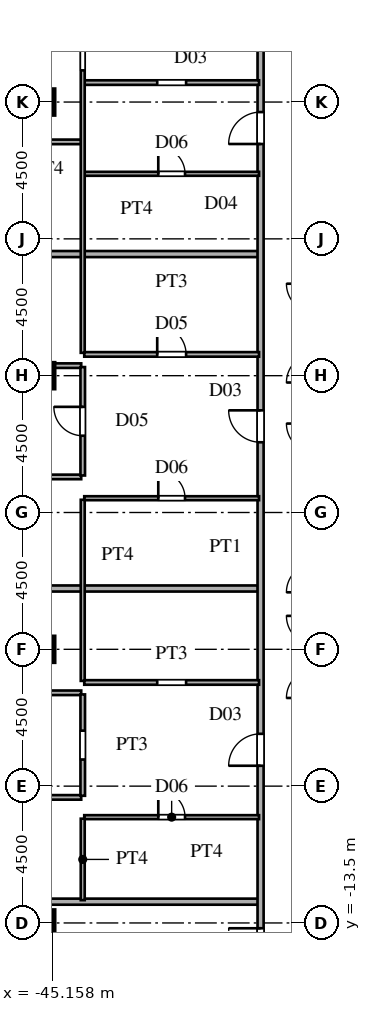
"""IFC4 building model, lengths in metres.
Left out: names, types, materials, properties, quantities, classifications, styles, units other than length and angle.
Written with IfcOpenShell. Run it as: python <this file> out.ifc"""

import sys

from ifc_helpers import new_model, si_unit, direction, frame, frame_2d, origin, origin_2d, place, context, subcontext, project, spatial, rectangle, i_section, extrude, source, transform, mapped, element, fill, save


model = new_model("IFC4")
c1 = context("Model", 3, precision=1e-05, world=origin(), true_north=direction((0.0, 1.0)))
c2 = subcontext(c1, "Body", "Model", "MODEL_VIEW")
j1 = project(units=[si_unit("LENGTHUNIT", "METRE"), si_unit("PLANEANGLEUNIT", "RADIAN")], contexts=[c1])
p1 = place(None, origin())
s1 = spatial("IfcSite", under=j1, at=p1, CompositionType="ELEMENT")
p2 = place(p1, origin())
s2 = spatial("IfcBuilding", under=s1, at=p2, CompositionType="ELEMENT")
p3 = place(p2, frame((0.0, 0.0, 99.6)))
s3 = spatial("IfcBuildingStorey", under=s2, at=p3, CompositionType="ELEMENT", Elevation=99.6)
m1 = source(origin(), c2, "Body", "SweptSolid", [
    extrude(i_section(OverallWidth=0.8, OverallDepth=0.8, WebThickness=0.032, FlangeThickness=0.05, at=origin_2d()), origin(), (0.0, 0.0, 1.0), 3.6),
])
for number, where, z_axis, x_axis in (
    (1, (-45.5, -13.5, 0.0), (0.0, 0.0, 1.0), (1.0, 0.0, 0.0)),
    (2, (-45.5, -4.5, 0.0), (0.0, 0.0, 1.0), (1.0, 0.0, 0.0)),
    (3, (-45.5, 4.5, 0.0), (0.0, 0.0, 1.0), (1.0, 0.0, 0.0)),
    (4, (-45.5, 13.5, 0.0), (0.0, 0.0, 1.0), (1.0, 0.0, 0.0)),
):
    element("IfcColumn", number, at=place(p3, frame(where, z_axis=z_axis, x_axis=x_axis)), inside=s3, PredefinedType="COLUMN", context=c2, shape_type="MappedRepresentation", body=[
        mapped(m1, transform((0.0, 0.0, 0.0), scale=1.0)),
    ])
p4 = place(p3, frame((-59.234, -12.8, 0.0), z_axis=(0.0, 0.0, 1.0), x_axis=(1.0, 0.0, 0.0)))
e5 = element("IfcWall", 5, at=p4, inside=s3, PredefinedType="PARTITIONING", context=c2, shape_type="SweptSolid", body=[
    extrude(rectangle(XDim=20.854, YDim=0.2, at=frame_2d((10.427, 0.0))), origin(), (0.0, 0.0, 1.0), 3.38),
])
p5 = place(p3, frame((-44.1, -10.02, 0.0), z_axis=(0.0, 0.0, 1.0), x_axis=(1.0, 0.0, 0.0)))
e6 = element("IfcWall", 6, at=p5, inside=s3, PredefinedType="PARTITIONING", context=c2, shape_type="SweptSolid", body=[
    extrude(rectangle(XDim=5.75, YDim=0.13, at=frame_2d((2.875, 0.0))), origin(), (0.0, 0.0, 1.0), 3.38),
])
p6 = place(p5, frame((2.435, 0.0, 0.0)))
e7 = element("IfcOpeningElement", 7, at=p6, cuts=e6, PredefinedType="OPENING", context=c2, shape_type="SweptSolid", body=[
    extrude(rectangle(XDim=0.88, YDim=2.1, at=frame_2d((0.44, 1.05))), frame((0.0, 0.075, 0.0), z_axis=(0.0, -1.0, 0.0), x_axis=(1.0, 0.0, 0.0)), (0.0, 0.0, 1.0), 0.15),
])
p7 = place(p3, frame((-66.887, -9.37, 0.0), z_axis=(0.0, 0.0, 1.0), x_axis=(1.0, 0.0, 0.0)))
e8 = element("IfcWall", 8, at=p7, inside=s3, PredefinedType="PARTITIONING", context=c2, shape_type="SweptSolid", body=[
    extrude(rectangle(XDim=22.687, YDim=0.15, at=frame_2d((11.344, 0.0))), origin(), (0.0, 0.0, 1.0), 3.38),
])
p8 = place(p7, frame((17.087, 0.0, 0.0)))
e9 = element("IfcOpeningElement", 9, at=p8, cuts=e8, PredefinedType="OPENING", context=c2, shape_type="SweptSolid", body=[
    extrude(rectangle(XDim=0.95, YDim=2.15, at=frame_2d((0.475, 1.075))), frame((0.0, 0.085, 0.0), z_axis=(0.0, -1.0, 0.0), x_axis=(1.0, 0.0, 0.0)), (0.0, 0.0, 1.0), 0.17),
])
p9 = place(p3, frame((-71.035, -5.93, 0.0), z_axis=(0.0, 0.0, 1.0), x_axis=(1.0, 0.0, 0.0)))
e10 = element("IfcWall", 10, at=p9, inside=s3, PredefinedType="PARTITIONING", context=c2, shape_type="SweptSolid", body=[
    extrude(rectangle(XDim=26.835, YDim=0.15, at=frame_2d((13.417, 0.0))), origin(), (0.0, 0.0, 1.0), 3.38),
])
p10 = place(p9, frame((21.235, 0.0, 0.0)))
e11 = element("IfcOpeningElement", 11, at=p10, cuts=e10, PredefinedType="OPENING", context=c2, shape_type="SweptSolid", body=[
    extrude(rectangle(XDim=0.95, YDim=2.15, at=frame_2d((0.475, 1.075))), frame((0.0, 0.085, 0.0), z_axis=(0.0, -1.0, 0.0), x_axis=(1.0, 0.0, 0.0)), (0.0, 0.0, 1.0), 0.17),
])
p11 = place(p3, frame((-44.1, -5.59, 0.0), z_axis=(0.0, 0.0, 1.0), x_axis=(1.0, 0.0, 0.0)))
e12 = element("IfcWall", 12, at=p11, inside=s3, PredefinedType="PARTITIONING", context=c2, shape_type="SweptSolid", body=[
    extrude(rectangle(XDim=5.75, YDim=0.15, at=frame_2d((2.875, 0.0))), origin(), (0.0, 0.0, 1.0), 3.38),
])
p12 = place(p11, frame((2.4, 0.0, 0.0)))
e13 = element("IfcOpeningElement", 13, at=p12, cuts=e12, PredefinedType="OPENING", context=c2, shape_type="SweptSolid", body=[
    extrude(rectangle(XDim=0.95, YDim=2.15, at=frame_2d((0.475, 1.075))), frame((0.0, 0.085, 0.0), z_axis=(0.0, -1.0, 0.0), x_axis=(1.0, 0.0, 0.0)), (0.0, 0.0, 1.0), 0.17),
])
p13 = place(p3, frame((-71.005, -2.5, 0.0), z_axis=(0.0, 0.0, 1.0), x_axis=(1.0, 0.0, 0.0)))
e14 = element("IfcWall", 14, at=p13, inside=s3, PredefinedType="PARTITIONING", context=c2, shape_type="SweptSolid", body=[
    extrude(rectangle(XDim=32.625, YDim=0.2, at=frame_2d((16.312, 0.0))), origin(), (0.0, 0.0, 1.0), 3.38),
])
p14 = place(p3, frame((-44.1, 0.47, 0.0), z_axis=(0.0, 0.0, 1.0), x_axis=(1.0, 0.0, 0.0)))
e15 = element("IfcWall", 15, at=p14, inside=s3, PredefinedType="PARTITIONING", context=c2, shape_type="SweptSolid", body=[
    extrude(rectangle(XDim=5.75, YDim=0.13, at=frame_2d((2.875, 0.0))), origin(), (0.0, 0.0, 1.0), 3.38),
])
p15 = place(p14, frame((2.435, 0.0, 0.0)))
e16 = element("IfcOpeningElement", 16, at=p15, cuts=e15, PredefinedType="OPENING", context=c2, shape_type="SweptSolid", body=[
    extrude(rectangle(XDim=0.88, YDim=2.1, at=frame_2d((0.44, 1.05))), frame((0.0, 0.075, 0.0), z_axis=(0.0, -1.0, 0.0), x_axis=(1.0, 0.0, 0.0)), (0.0, 0.0, 1.0), 0.15),
])
p16 = place(p3, frame((-71.035, 1.17, 0.0), z_axis=(0.0, 0.0, 1.0), x_axis=(1.0, 0.0, 0.0)))
e17 = element("IfcWall", 17, at=p16, inside=s3, PredefinedType="PARTITIONING", context=c2, shape_type="SweptSolid", body=[
    extrude(rectangle(XDim=26.835, YDim=0.15, at=frame_2d((13.417, 0.0))), origin(), (0.0, 0.0, 1.0), 3.38),
])
p17 = place(p16, frame((21.235, 0.0, 0.0)))
e18 = element("IfcOpeningElement", 18, at=p17, cuts=e17, PredefinedType="OPENING", context=c2, shape_type="SweptSolid", body=[
    extrude(rectangle(XDim=0.95, YDim=2.15, at=frame_2d((0.475, 1.075))), frame((0.0, 0.085, 0.0), z_axis=(0.0, -1.0, 0.0), x_axis=(1.0, 0.0, 0.0)), (0.0, 0.0, 1.0), 0.17),
])
p18 = place(p16, frame((13.21, 0.0, 0.0)))
e19 = element("IfcOpeningElement", 19, at=p18, cuts=e17, PredefinedType="OPENING", context=c2, shape_type="SweptSolid", body=[
    extrude(rectangle(XDim=0.95, YDim=2.15, at=frame_2d((0.475, 1.075))), frame((0.0, 0.085, 0.0), z_axis=(0.0, -1.0, 0.0), x_axis=(1.0, 0.0, 0.0)), (0.0, 0.0, 1.0), 0.17),
])
p19 = place(p3, frame((-71.035, 4.83, 0.0), z_axis=(0.0, 0.0, 1.0), x_axis=(1.0, 0.0, 0.0)))
e20 = element("IfcWall", 20, at=p19, inside=s3, PredefinedType="PARTITIONING", context=c2, shape_type="SweptSolid", body=[
    extrude(rectangle(XDim=26.835, YDim=0.15, at=frame_2d((13.417, 0.0))), origin(), (0.0, 0.0, 1.0), 3.38),
])
p20 = place(p19, frame((21.235, 0.0, 0.0)))
e21 = element("IfcOpeningElement", 21, at=p20, cuts=e20, PredefinedType="OPENING", context=c2, shape_type="SweptSolid", body=[
    extrude(rectangle(XDim=0.95, YDim=2.15, at=frame_2d((0.475, 1.075))), frame((0.0, 0.085, 0.0), z_axis=(0.0, -1.0, 0.0), x_axis=(1.0, 0.0, 0.0)), (0.0, 0.0, 1.0), 0.17),
])
p21 = place(p19, frame((13.21, 0.0, 0.0)))
e22 = element("IfcOpeningElement", 22, at=p21, cuts=e20, PredefinedType="OPENING", context=c2, shape_type="SweptSolid", body=[
    extrude(rectangle(XDim=0.95, YDim=2.15, at=frame_2d((0.475, 1.075))), frame((0.0, 0.085, 0.0), z_axis=(0.0, -1.0, 0.0), x_axis=(1.0, 0.0, 0.0)), (0.0, 0.0, 1.0), 0.17),
])
p22 = place(p3, frame((-44.1, 5.2, 0.0), z_axis=(0.0, 0.0, 1.0), x_axis=(1.0, 0.0, 0.0)))
e23 = element("IfcWall", 23, at=p22, inside=s3, PredefinedType="PARTITIONING", context=c2, shape_type="SweptSolid", body=[
    extrude(rectangle(XDim=5.75, YDim=0.15, at=frame_2d((2.875, 0.0))), origin(), (0.0, 0.0, 1.0), 3.38),
])
p23 = place(p22, frame((2.4, 0.0, 0.0)))
e24 = element("IfcOpeningElement", 24, at=p23, cuts=e23, PredefinedType="OPENING", context=c2, shape_type="SweptSolid", body=[
    extrude(rectangle(XDim=0.95, YDim=2.15, at=frame_2d((0.475, 1.075))), frame((0.0, 0.085, 0.0), z_axis=(0.0, -1.0, 0.0), x_axis=(1.0, 0.0, 0.0)), (0.0, 0.0, 1.0), 0.17),
])
p24 = place(p3, frame((-68.79, 8.5, 0.0), z_axis=(0.0, 0.0, 1.0), x_axis=(1.0, 0.0, 0.0)))
e25 = element("IfcWall", 25, at=p24, inside=s3, PredefinedType="PARTITIONING", context=c2, shape_type="SweptSolid", body=[
    extrude(rectangle(XDim=30.41, YDim=0.2, at=frame_2d((15.205, 0.0))), origin(), (0.0, 0.0, 1.0), 3.38),
])
p25 = place(p3, frame((-44.1, 11.14, 0.0), z_axis=(0.0, 0.0, 1.0), x_axis=(1.0, 0.0, 0.0)))
e26 = element("IfcWall", 26, at=p25, inside=s3, PredefinedType="PARTITIONING", context=c2, shape_type="SweptSolid", body=[
    extrude(rectangle(XDim=5.75, YDim=0.13, at=frame_2d((2.875, 0.0))), origin(), (0.0, 0.0, 1.0), 3.38),
])
p26 = place(p25, frame((2.435, 0.0, 0.0)))
e27 = element("IfcOpeningElement", 27, at=p26, cuts=e26, PredefinedType="OPENING", context=c2, shape_type="SweptSolid", body=[
    extrude(rectangle(XDim=0.88, YDim=2.1, at=frame_2d((0.44, 1.05))), frame((0.0, 0.075, 0.0), z_axis=(0.0, -1.0, 0.0), x_axis=(1.0, 0.0, 0.0)), (0.0, 0.0, 1.0), 0.15),
])
p27 = place(p3, frame((-60.603, 12.19, 0.0), z_axis=(0.0, 0.0, 1.0), x_axis=(1.0, 0.0, 0.0)))
e28 = element("IfcWall", 28, at=p27, inside=s3, PredefinedType="PARTITIONING", context=c2, shape_type="SweptSolid", body=[
    extrude(rectangle(XDim=16.403, YDim=0.15, at=frame_2d((8.202, 0.0))), origin(), (0.0, 0.0, 1.0), 3.38),
])
p28 = place(p27, frame((10.803, 0.0, 0.0)))
e29 = element("IfcOpeningElement", 29, at=p28, cuts=e28, PredefinedType="OPENING", context=c2, shape_type="SweptSolid", body=[
    extrude(rectangle(XDim=0.95, YDim=2.15, at=frame_2d((0.475, 1.075))), frame((0.0, 0.085, 0.0), z_axis=(0.0, -1.0, 0.0), x_axis=(1.0, 0.0, 0.0)), (0.0, 0.0, 1.0), 0.17),
])
p29 = place(p27, frame((2.594, 0.0, 0.0)))
e30 = element("IfcOpeningElement", 30, at=p29, cuts=e28, PredefinedType="OPENING", context=c2, shape_type="SweptSolid", body=[
    extrude(rectangle(XDim=0.95, YDim=2.15, at=frame_2d((0.475, 1.075))), frame((0.0, 0.085, 0.0), z_axis=(0.0, -1.0, 0.0), x_axis=(1.0, 0.0, 0.0)), (0.0, 0.0, 1.0), 0.17),
])
p30 = place(p3, frame((-44.1, 14.14, 0.0), z_axis=(0.0, 0.0, 1.0), x_axis=(1.0, 0.0, 0.0)))
e31 = element("IfcWall", 31, at=p30, inside=s3, PredefinedType="PARTITIONING", context=c2, shape_type="SweptSolid", body=[
    extrude(rectangle(XDim=5.75, YDim=0.15, at=frame_2d((2.875, 0.0))), origin(), (0.0, 0.0, 1.0), 3.38),
])
p31 = place(p30, frame((2.4, 0.0, 0.0)))
e32 = element("IfcOpeningElement", 32, at=p31, cuts=e31, PredefinedType="OPENING", context=c2, shape_type="SweptSolid", body=[
    extrude(rectangle(XDim=0.95, YDim=2.15, at=frame_2d((0.475, 1.075))), frame((0.0, 0.085, 0.0), z_axis=(0.0, -1.0, 0.0), x_axis=(1.0, 0.0, 0.0)), (0.0, 0.0, 1.0), 0.17),
])
p32 = place(p3, frame((-44.15, -12.75, 0.0), z_axis=(0.0, 0.0, 1.0), x_axis=(0.0, 1.0, 0.0)))
e33 = element("IfcWall", 33, at=p32, inside=s3, PredefinedType="PARTITIONING", context=c2, shape_type="SweptSolid", body=[
    extrude(rectangle(XDim=2.679, YDim=0.13, at=frame_2d((1.339, 0.0))), origin(), (0.0, 0.0, 1.0), 3.38),
])
p33 = place(p3, frame((-44.15, -9.317, 0.0), z_axis=(0.0, 0.0, 1.0), x_axis=(0.0, 1.0, 0.0)))
e34 = element("IfcWall", 34, at=p33, inside=s3, PredefinedType="PARTITIONING", context=c2, shape_type="SweptSolid", body=[
    extrude(rectangle(XDim=3.334, YDim=0.15, at=frame_2d((1.667, 0.0))), origin(), (0.0, 0.0, 1.0), 3.38),
])
p34 = place(p33, frame((1.192, 0.0, 0.0)))
e35 = element("IfcOpeningElement", 35, at=p34, cuts=e34, PredefinedType="OPENING", context=c2, shape_type="SweptSolid", body=[
    extrude(rectangle(XDim=0.95, YDim=2.15, at=frame_2d((0.475, 1.075))), frame((0.0, 0.085, 0.0), z_axis=(0.0, -1.0, 0.0), x_axis=(1.0, 0.0, 0.0)), (0.0, 0.0, 1.0), 0.17),
])
p35 = place(p3, frame((-44.15, -5.538, 0.0), z_axis=(0.0, 0.0, 1.0), x_axis=(0.0, 1.0, 0.0)))
e36 = element("IfcWall", 36, at=p35, inside=s3, PredefinedType="PARTITIONING", context=c2, shape_type="SweptSolid", body=[
    extrude(rectangle(XDim=5.956, YDim=0.13, at=frame_2d((2.978, 0.0))), origin(), (0.0, 0.0, 1.0), 3.38),
])
p36 = place(p3, frame((-44.15, 1.217, 0.0), z_axis=(0.0, 0.0, 1.0), x_axis=(0.0, 1.0, 0.0)))
e37 = element("IfcWall", 37, at=p36, inside=s3, PredefinedType="PARTITIONING", context=c2, shape_type="SweptSolid", body=[
    extrude(rectangle(XDim=3.566, YDim=0.15, at=frame_2d((1.783, 0.0))), origin(), (0.0, 0.0, 1.0), 3.38),
])
p37 = place(p36, frame((1.308, 0.0, 0.0)))
e38 = element("IfcOpeningElement", 38, at=p37, cuts=e37, PredefinedType="OPENING", context=c2, shape_type="SweptSolid", body=[
    extrude(rectangle(XDim=0.95, YDim=2.15, at=frame_2d((0.475, 1.075))), frame((0.0, 0.085, 0.0), z_axis=(0.0, -1.0, 0.0), x_axis=(1.0, 0.0, 0.0)), (0.0, 0.0, 1.0), 0.17),
])
p38 = place(p3, frame((-44.15, 5.252, 0.0), z_axis=(0.0, 0.0, 1.0), x_axis=(0.0, 1.0, 0.0)))
e39 = element("IfcWall", 39, at=p38, inside=s3, PredefinedType="PARTITIONING", context=c2, shape_type="SweptSolid", body=[
    extrude(rectangle(XDim=14.365, YDim=0.13, at=frame_2d((7.183, 0.0))), origin(), (0.0, 0.0, 1.0), 3.38),
])
p39 = place(p38, frame((9.29, 0.0, 0.0)))
e40 = element("IfcOpeningElement", 40, at=p39, cuts=e39, PredefinedType="OPENING", context=c2, shape_type="SweptSolid", body=[
    extrude(rectangle(XDim=0.95, YDim=2.15, at=frame_2d((0.475, 1.075))), frame((0.0, 0.075, 0.0), z_axis=(0.0, -1.0, 0.0), x_axis=(1.0, 0.0, 0.0)), (0.0, 0.0, 1.0), 0.15),
])
p40 = place(p3, frame((-38.3, -15.515, 0.0), z_axis=(0.0, 0.0, 1.0), x_axis=(0.0, 1.0, 0.0)))
e41 = element("IfcWall", 41, at=p40, inside=s3, PredefinedType="PARTITIONING", context=c2, shape_type="SweptSolid", body=[
    extrude(rectangle(XDim=31.03, YDim=0.2, at=frame_2d((15.515, 0.0))), origin(), (0.0, 0.0, 1.0), 3.38),
])
p41 = place(p40, frame((0.79, 0.0, 0.0)))
e42 = element("IfcOpeningElement", 42, at=p41, cuts=e41, PredefinedType="OPENING", context=c2, shape_type="SweptSolid", body=[
    extrude(rectangle(XDim=1.05, YDim=2.25, at=frame_2d((0.525, 1.125))), frame((0.0, 0.11, 0.0), z_axis=(0.0, -1.0, 0.0), x_axis=(1.0, 0.0, 0.0)), (0.0, 0.0, 1.0), 0.22),
])
p42 = place(p40, frame((7.186, 0.0, 0.0)))
e43 = element("IfcOpeningElement", 43, at=p42, cuts=e41, PredefinedType="OPENING", context=c2, shape_type="SweptSolid", body=[
    extrude(rectangle(XDim=1.05, YDim=2.25, at=frame_2d((0.525, 1.125))), frame((0.0, 0.11, 0.0), z_axis=(0.0, -1.0, 0.0), x_axis=(1.0, 0.0, 0.0)), (0.0, 0.0, 1.0), 0.22),
])
p43 = place(p40, frame((17.825, 0.0, 0.0)))
e44 = element("IfcOpeningElement", 44, at=p43, cuts=e41, PredefinedType="OPENING", context=c2, shape_type="SweptSolid", body=[
    extrude(rectangle(XDim=1.05, YDim=2.25, at=frame_2d((0.525, 1.125))), frame((0.0, 0.11, 0.0), z_axis=(0.0, -1.0, 0.0), x_axis=(1.0, 0.0, 0.0)), (0.0, 0.0, 1.0), 0.22),
])
p44 = place(p40, frame((27.635, 0.0, 0.0)))
e45 = element("IfcOpeningElement", 45, at=p44, cuts=e41, PredefinedType="OPENING", context=c2, shape_type="SweptSolid", body=[
    extrude(rectangle(XDim=1.05, YDim=2.25, at=frame_2d((0.525, 1.125))), frame((0.0, 0.11, 0.0), z_axis=(0.0, -1.0, 0.0), x_axis=(1.0, 0.0, 0.0)), (0.0, 0.0, 1.0), 0.22),
])
m2 = source(origin(), c2, "Body", "SweptSolid", [
    extrude(rectangle(XDim=0.88, YDim=2.1, at=frame_2d((0.44, 1.05))), frame((0.0, 0.025, 0.0), z_axis=(0.0, -1.0, 0.0), x_axis=(1.0, 0.0, 0.0)), (0.0, 0.0, 1.0), 0.05),
])
p45 = place(p6, origin())
e46 = element("IfcDoor", 46, at=p45, inside=s3, OperationType="SINGLE_SWING_LEFT", PredefinedType="DOOR", context=c2, shape_type="MappedRepresentation", body=[
    mapped(m2, transform((0.0, 0.0, 0.0), scale=1.0)),
])
fill(e7, e46)
p46 = place(p15, origin())
e47 = element("IfcDoor", 47, at=p46, inside=s3, OperationType="SINGLE_SWING_LEFT", PredefinedType="DOOR", context=c2, shape_type="MappedRepresentation", body=[
    mapped(m2, transform((0.0, 0.0, 0.0), scale=1.0)),
])
fill(e16, e47)
m3 = source(origin(), c2, "Body", "SweptSolid", [
    extrude(rectangle(XDim=0.95, YDim=2.15, at=frame_2d((0.475, 1.075))), frame((0.0, 0.025, 0.0), z_axis=(0.0, -1.0, 0.0), x_axis=(1.0, 0.0, 0.0)), (0.0, 0.0, 1.0), 0.05),
])
p47 = place(p23, origin())
e48 = element("IfcDoor", 48, at=p47, inside=s3, OperationType="SINGLE_SWING_LEFT", PredefinedType="DOOR", context=c2, shape_type="MappedRepresentation", body=[
    mapped(m3, transform((0.0, 0.0, 0.0), scale=1.0)),
])
fill(e24, e48)
p48 = place(p26, origin())
e49 = element("IfcDoor", 49, at=p48, inside=s3, OperationType="SINGLE_SWING_LEFT", PredefinedType="DOOR", context=c2, shape_type="MappedRepresentation", body=[
    mapped(m2, transform((0.0, 0.0, 0.0), scale=1.0)),
])
fill(e27, e49)
p49 = place(p37, origin())
e50 = element("IfcDoor", 50, at=p49, inside=s3, OperationType="SINGLE_SWING_RIGHT", PredefinedType="DOOR", context=c2, shape_type="MappedRepresentation", body=[
    mapped(m3, transform((0.0, 0.0, 0.0), scale=1.0)),
])
fill(e38, e50)
m4 = source(origin(), c2, "Body", "SweptSolid", [
    extrude(rectangle(XDim=1.05, YDim=2.25, at=frame_2d((0.525, 1.125))), frame((0.0, 0.025, 0.0), z_axis=(0.0, -1.0, 0.0), x_axis=(1.0, 0.0, 0.0)), (0.0, 0.0, 1.0), 0.05),
])
p50 = place(p41, origin())
e51 = element("IfcDoor", 51, at=p50, inside=s3, OperationType="SINGLE_SWING_RIGHT", PredefinedType="DOOR", context=c2, shape_type="MappedRepresentation", body=[
    mapped(m4, transform((0.0, 0.0, 0.0), scale=1.0)),
])
fill(e42, e51)
p51 = place(p42, origin())
e52 = element("IfcDoor", 52, at=p51, inside=s3, OperationType="SINGLE_SWING_LEFT", PredefinedType="DOOR", context=c2, shape_type="MappedRepresentation", body=[
    mapped(m4, transform((0.0, 0.0, 0.0), scale=1.0)),
])
fill(e43, e52)
p52 = place(p43, origin())
e53 = element("IfcDoor", 53, at=p52, inside=s3, OperationType="SINGLE_SWING_RIGHT", PredefinedType="DOOR", context=c2, shape_type="MappedRepresentation", body=[
    mapped(m4, transform((0.0, 0.0, 0.0), scale=1.0)),
])
fill(e44, e53)
p53 = place(p44, origin())
e54 = element("IfcDoor", 54, at=p53, inside=s3, OperationType="SINGLE_SWING_LEFT", PredefinedType="DOOR", context=c2, shape_type="MappedRepresentation", body=[
    mapped(m4, transform((0.0, 0.0, 0.0), scale=1.0)),
])
fill(e45, e54)
save(model, sys.argv[1])
